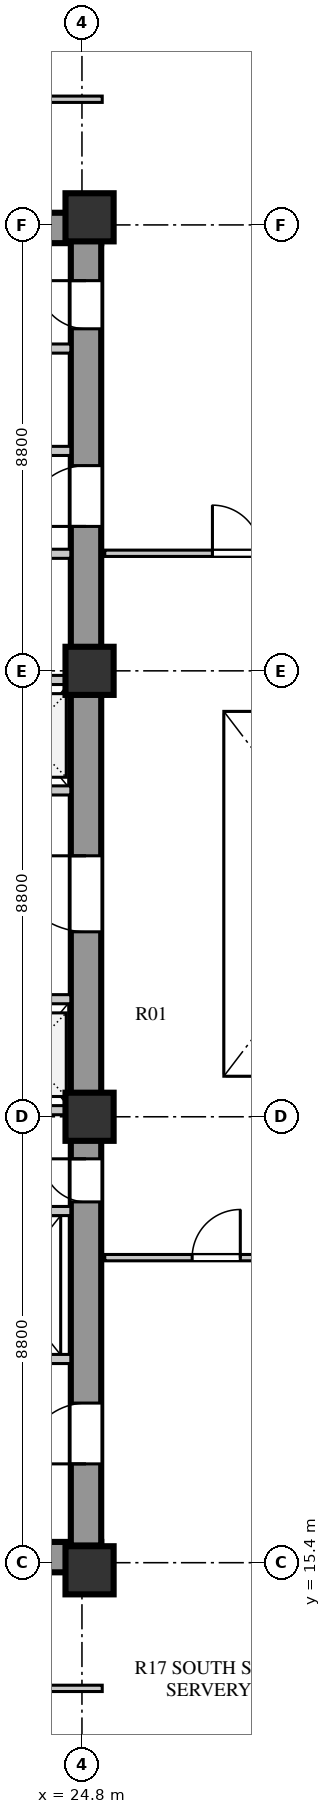
"""IFC4 building model, lengths in metres.
Left out: names, types, materials, properties, quantities, classifications, styles, units other than length and angle.
Written with IfcOpenShell. Run it as: python <this file> out.ifc"""

import sys

from ifc_helpers import new_model, si_unit, direction, frame, frame_2d, origin, origin_2d, place, context, subcontext, project, spatial, rectangle, extrude, element, fill, save


model = new_model("IFC4")
c1 = context("Model", 3, precision=1e-05, world=origin(), true_north=direction((0.0, 1.0)))
c2 = subcontext(c1, "Body", "Model", "MODEL_VIEW")
j1 = project(units=[si_unit("LENGTHUNIT", "METRE"), si_unit("PLANEANGLEUNIT", "RADIAN")], contexts=[c1])
p1 = place(None, origin())
s1 = spatial("IfcSite", under=j1, at=p1, CompositionType="ELEMENT")
p2 = place(p1, origin())
s2 = spatial("IfcBuilding", under=s1, at=p2, CompositionType="ELEMENT")
p3 = place(p2, frame((0.0, 0.0, 90.0)))
s3 = spatial("IfcBuildingStorey", under=s2, at=p3, CompositionType="ELEMENT", Elevation=90.0)
for number, where, z_axis, x_axis in (
    (1, (15.3, 15.51, 0.0), (0.0, 0.0, 1.0), (1.0, 0.0, 0.0)),
    (2, (15.3, 41.74, 0.0), (0.0, 0.0, 1.0), (1.0, 0.0, 0.0)),
):
    element("IfcWall", number, at=place(p3, frame(where, z_axis=z_axis, x_axis=x_axis)), inside=s3, PredefinedType="SHEAR", context=c2, shape_type="SweptSolid", body=[
        extrude(rectangle(XDim=9.88, YDim=0.6, at=frame_2d((4.94, 0.0))), origin(), (0.0, 0.0, 1.0), 3.7),
    ])
p4 = place(p3, frame((24.88, 15.74, 0.0), z_axis=(0.0, 0.0, 1.0), x_axis=(0.0, 1.0, 0.0)))
e3 = element("IfcWall", 3, at=p4, inside=s3, PredefinedType="SHEAR", context=c2, shape_type="SweptSolid", body=[
    extrude(rectangle(XDim=25.76, YDim=0.6, at=frame_2d((12.88, 0.0))), origin(), (0.0, 0.0, 1.0), 3.7),
])
p5 = place(p4, frame((1.61, 0.0, 0.0)))
e4 = element("IfcOpeningElement", 4, at=p5, cuts=e3, PredefinedType="OPENING", context=c2, shape_type="SweptSolid", body=[
    extrude(rectangle(XDim=1.2, YDim=2.1, at=frame_2d((0.6, 1.05))), frame((0.0, 0.31, 0.0), z_axis=(0.0, -1.0, 0.0), x_axis=(1.0, 0.0, 0.0)), (0.0, 0.0, 1.0), 0.62),
])
p6 = place(p4, frame((6.78, 0.0, 0.0)))
e5 = element("IfcOpeningElement", 5, at=p6, cuts=e3, PredefinedType="OPENING", context=c2, shape_type="SweptSolid", body=[
    extrude(rectangle(XDim=0.85, YDim=2.06, at=frame_2d((0.425, 1.03))), frame((0.0, 0.31, 0.0), z_axis=(0.0, -1.0, 0.0), x_axis=(1.0, 0.0, 0.0)), (0.0, 0.0, 1.0), 0.62),
])
p7 = place(p4, frame((12.11, 0.0, 0.0)))
e6 = element("IfcOpeningElement", 6, at=p7, cuts=e3, PredefinedType="OPENING", context=c2, shape_type="SweptSolid", body=[
    extrude(rectangle(XDim=1.5, YDim=2.12, at=frame_2d((0.75, 1.06))), frame((0.0, 0.31, 0.0), z_axis=(0.0, -1.0, 0.0), x_axis=(1.0, 0.0, 0.0)), (0.0, 0.0, 1.0), 0.62),
])
p8 = place(p4, frame((20.11, 0.0, 0.0)))
e7 = element("IfcOpeningElement", 7, at=p8, cuts=e3, PredefinedType="OPENING", context=c2, shape_type="SweptSolid", body=[
    extrude(rectangle(XDim=1.2, YDim=2.12, at=frame_2d((0.6, 1.06))), frame((0.0, 0.31, 0.0), z_axis=(0.0, -1.0, 0.0), x_axis=(1.0, 0.0, 0.0)), (0.0, 0.0, 1.0), 0.62),
])
p9 = place(p4, frame((24.01, 0.0, 0.0)))
e8 = element("IfcOpeningElement", 8, at=p9, cuts=e3, PredefinedType="OPENING", context=c2, shape_type="SweptSolid", body=[
    extrude(rectangle(XDim=0.95, YDim=2.1, at=frame_2d((0.475, 1.05))), frame((0.0, 0.31, 0.0), z_axis=(0.0, -1.0, 0.0), x_axis=(1.0, 0.0, 0.0)), (0.0, 0.0, 1.0), 0.62),
])
for number, where, z_axis, x_axis in (
    (9, (24.95, 15.25, 0.0), (0.0, 0.0, 1.0), (1.0, 0.0, 0.0)),
    (10, (24.95, 24.2, 0.0), (0.0, 0.0, 1.0), (1.0, 0.0, 0.0)),
    (11, (24.95, 33.0, 0.0), (0.0, 0.0, 1.0), (1.0, 0.0, 0.0)),
    (12, (24.95, 41.95, 0.0), (0.0, 0.0, 1.0), (1.0, 0.0, 0.0)),
):
    element("IfcColumn", number, at=place(p3, frame(where, z_axis=z_axis, x_axis=x_axis)), inside=s3, PredefinedType="COLUMN", context=c2, shape_type="SweptSolid", body=[
        extrude(rectangle(XDim=0.95, YDim=0.95, at=origin_2d()), origin(), (0.0, 0.0, 1.0), 3.7),
    ])
p10 = place(p3, frame((19.64, 19.42, 0.0), z_axis=(0.0, 0.0, 1.0), x_axis=(1.0, 0.0, 0.0)))
e13 = element("IfcWall", 13, at=p10, inside=s3, PredefinedType="SOLIDWALL", context=c2, shape_type="SweptSolid", body=[
    extrude(rectangle(XDim=4.94, YDim=0.18, at=frame_2d((2.47, 0.0))), origin(), (0.0, 0.0, 1.0), 3.7),
])
p11 = place(p10, frame((0.72, 0.0, 0.0)))
e14 = element("IfcOpeningElement", 14, at=p11, cuts=e13, PredefinedType="OPENING", context=c2, shape_type="SweptSolid", body=[
    extrude(rectangle(XDim=1.1, YDim=2.1, at=frame_2d((0.55, 1.05))), frame((0.0, 0.1, 0.0), z_axis=(0.0, -1.0, 0.0), x_axis=(1.0, 0.0, 0.0)), (0.0, 0.0, 1.0), 0.2),
])
p12 = place(p10, frame((3.02, 0.0, 0.0)))
e15 = element("IfcOpeningElement", 15, at=p12, cuts=e13, PredefinedType="OPENING", context=c2, shape_type="SweptSolid", body=[
    extrude(rectangle(XDim=1.1, YDim=2.1, at=frame_2d((0.55, 1.05))), frame((0.0, 0.1, 0.0), z_axis=(0.0, -1.0, 0.0), x_axis=(1.0, 0.0, 0.0)), (0.0, 0.0, 1.0), 0.2),
])
p13 = place(p3, frame((19.64, 22.34, 0.0), z_axis=(0.0, 0.0, 1.0), x_axis=(1.0, 0.0, 0.0)))
e16 = element("IfcWall", 16, at=p13, inside=s3, PredefinedType="SOLIDWALL", context=c2, shape_type="SweptSolid", body=[
    extrude(rectangle(XDim=4.94, YDim=0.18, at=frame_2d((2.47, 0.0))), origin(), (0.0, 0.0, 1.0), 3.7),
])
p14 = place(p3, frame((15.9, 26.52, 0.0), z_axis=(0.0, 0.0, 1.0), x_axis=(1.0, 0.0, 0.0)))
e17 = element("IfcWall", 17, at=p14, inside=s3, PredefinedType="SOLIDWALL", context=c2, shape_type="SweptSolid", body=[
    extrude(rectangle(XDim=8.68, YDim=0.18, at=frame_2d((4.34, 0.0))), origin(), (0.0, 0.0, 1.0), 3.7),
])
p15 = place(p14, frame((1.76, 0.0, 0.0)))
e18 = element("IfcOpeningElement", 18, at=p15, cuts=e17, PredefinedType="OPENING", context=c2, shape_type="SweptSolid", body=[
    extrude(rectangle(XDim=1.0, YDim=2.1, at=frame_2d((0.5, 1.05))), frame((0.0, 0.1, 0.0), z_axis=(0.0, -1.0, 0.0), x_axis=(1.0, 0.0, 0.0)), (0.0, 0.0, 1.0), 0.2),
])
p16 = place(p14, frame((3.6, 0.0, 0.0)))
e19 = element("IfcOpeningElement", 19, at=p16, cuts=e17, PredefinedType="OPENING", context=c2, shape_type="SweptSolid", body=[
    extrude(rectangle(XDim=1.0, YDim=2.1, at=frame_2d((0.5, 1.05))), frame((0.0, 0.1, 0.0), z_axis=(0.0, -1.0, 0.0), x_axis=(1.0, 0.0, 0.0)), (0.0, 0.0, 1.0), 0.2),
])
p17 = place(p14, frame((5.44, 0.0, 0.0)))
e20 = element("IfcOpeningElement", 20, at=p17, cuts=e17, PredefinedType="OPENING", context=c2, shape_type="SweptSolid", body=[
    extrude(rectangle(XDim=1.0, YDim=2.1, at=frame_2d((0.5, 1.05))), frame((0.0, 0.1, 0.0), z_axis=(0.0, -1.0, 0.0), x_axis=(1.0, 0.0, 0.0)), (0.0, 0.0, 1.0), 0.2),
])
p18 = place(p14, frame((7.28, 0.0, 0.0)))
e21 = element("IfcOpeningElement", 21, at=p18, cuts=e17, PredefinedType="OPENING", context=c2, shape_type="SweptSolid", body=[
    extrude(rectangle(XDim=1.0, YDim=2.1, at=frame_2d((0.5, 1.05))), frame((0.0, 0.1, 0.0), z_axis=(0.0, -1.0, 0.0), x_axis=(1.0, 0.0, 0.0)), (0.0, 0.0, 1.0), 0.2),
])
p19 = place(p3, frame((15.9, 24.33, 0.0), z_axis=(0.0, 0.0, 1.0), x_axis=(1.0, 0.0, 0.0)))
e22 = element("IfcWall", 22, at=p19, inside=s3, PredefinedType="SOLIDWALL", context=c2, shape_type="SweptSolid", body=[
    extrude(rectangle(XDim=8.68, YDim=0.18, at=frame_2d((4.34, 0.0))), origin(), (0.0, 0.0, 1.0), 3.0),
])
p20 = place(p3, frame((15.9, 30.64, 0.0), z_axis=(0.0, 0.0, 1.0), x_axis=(1.0, 0.0, 0.0)))
e23 = element("IfcWall", 23, at=p20, inside=s3, PredefinedType="SOLIDWALL", context=c2, shape_type="SweptSolid", body=[
    extrude(rectangle(XDim=8.68, YDim=0.18, at=frame_2d((4.34, 0.0))), origin(), (0.0, 0.0, 1.0), 3.7),
])
p21 = place(p20, frame((1.76, 0.0, 0.0)))
e24 = element("IfcOpeningElement", 24, at=p21, cuts=e23, PredefinedType="OPENING", context=c2, shape_type="SweptSolid", body=[
    extrude(rectangle(XDim=1.0, YDim=2.1, at=frame_2d((0.5, 1.05))), frame((0.0, 0.1, 0.0), z_axis=(0.0, -1.0, 0.0), x_axis=(1.0, 0.0, 0.0)), (0.0, 0.0, 1.0), 0.2),
])
p22 = place(p20, frame((3.6, 0.0, 0.0)))
e25 = element("IfcOpeningElement", 25, at=p22, cuts=e23, PredefinedType="OPENING", context=c2, shape_type="SweptSolid", body=[
    extrude(rectangle(XDim=1.0, YDim=2.1, at=frame_2d((0.5, 1.05))), frame((0.0, 0.1, 0.0), z_axis=(0.0, -1.0, 0.0), x_axis=(1.0, 0.0, 0.0)), (0.0, 0.0, 1.0), 0.2),
])
p23 = place(p20, frame((5.44, 0.0, 0.0)))
e26 = element("IfcOpeningElement", 26, at=p23, cuts=e23, PredefinedType="OPENING", context=c2, shape_type="SweptSolid", body=[
    extrude(rectangle(XDim=1.0, YDim=2.1, at=frame_2d((0.5, 1.05))), frame((0.0, 0.1, 0.0), z_axis=(0.0, -1.0, 0.0), x_axis=(1.0, 0.0, 0.0)), (0.0, 0.0, 1.0), 0.2),
])
p24 = place(p20, frame((7.28, 0.0, 0.0)))
e27 = element("IfcOpeningElement", 27, at=p24, cuts=e23, PredefinedType="OPENING", context=c2, shape_type="SweptSolid", body=[
    extrude(rectangle(XDim=1.0, YDim=2.1, at=frame_2d((0.5, 1.05))), frame((0.0, 0.1, 0.0), z_axis=(0.0, -1.0, 0.0), x_axis=(1.0, 0.0, 0.0)), (0.0, 0.0, 1.0), 0.2),
])
p25 = place(p3, frame((15.9, 32.82, 0.0), z_axis=(0.0, 0.0, 1.0), x_axis=(1.0, 0.0, 0.0)))
e28 = element("IfcWall", 28, at=p25, inside=s3, PredefinedType="SOLIDWALL", context=c2, shape_type="SweptSolid", body=[
    extrude(rectangle(XDim=8.68, YDim=0.18, at=frame_2d((4.34, 0.0))), origin(), (0.0, 0.0, 1.0), 3.0),
])
p26 = place(p3, frame((22.02, 35.31, 0.0), z_axis=(0.0, 0.0, 1.0), x_axis=(1.0, 0.0, 0.0)))
e29 = element("IfcWall", 29, at=p26, inside=s3, PredefinedType="SOLIDWALL", context=c2, shape_type="SweptSolid", body=[
    extrude(rectangle(XDim=2.56, YDim=0.18, at=frame_2d((1.28, 0.0))), origin(), (0.0, 0.0, 1.0), 3.7),
])
p27 = place(p26, frame((0.55, 0.0, 0.0)))
e30 = element("IfcOpeningElement", 30, at=p27, cuts=e29, PredefinedType="OPENING", context=c2, shape_type="SweptSolid", body=[
    extrude(rectangle(XDim=1.0, YDim=2.1, at=frame_2d((0.5, 1.05))), frame((0.0, 0.1, 0.0), z_axis=(0.0, -1.0, 0.0), x_axis=(1.0, 0.0, 0.0)), (0.0, 0.0, 1.0), 0.2),
])
p28 = place(p3, frame((19.64, 37.34, 0.0), z_axis=(0.0, 0.0, 1.0), x_axis=(1.0, 0.0, 0.0)))
e31 = element("IfcWall", 31, at=p28, inside=s3, PredefinedType="SOLIDWALL", context=c2, shape_type="SweptSolid", body=[
    extrude(rectangle(XDim=4.94, YDim=0.18, at=frame_2d((2.47, 0.0))), origin(), (0.0, 0.0, 1.0), 3.7),
])
p29 = place(p28, frame((0.45, 0.0, 0.0)))
e32 = element("IfcOpeningElement", 32, at=p29, cuts=e31, PredefinedType="OPENING", context=c2, shape_type="SweptSolid", body=[
    extrude(rectangle(XDim=1.0, YDim=2.1, at=frame_2d((0.5, 1.05))), frame((0.0, 0.1, 0.0), z_axis=(0.0, -1.0, 0.0), x_axis=(1.0, 0.0, 0.0)), (0.0, 0.0, 1.0), 0.2),
])
p30 = place(p28, frame((2.5, 0.0, 0.0)))
e33 = element("IfcOpeningElement", 33, at=p30, cuts=e31, PredefinedType="OPENING", context=c2, shape_type="SweptSolid", body=[
    extrude(rectangle(XDim=1.0, YDim=2.1, at=frame_2d((0.5, 1.05))), frame((0.0, 0.1, 0.0), z_axis=(0.0, -1.0, 0.0), x_axis=(1.0, 0.0, 0.0)), (0.0, 0.0, 1.0), 0.2),
])
p31 = place(p3, frame((19.64, 39.36, 0.0), z_axis=(0.0, 0.0, 1.0), x_axis=(1.0, 0.0, 0.0)))
e34 = element("IfcWall", 34, at=p31, inside=s3, PredefinedType="SOLIDWALL", context=c2, shape_type="SweptSolid", body=[
    extrude(rectangle(XDim=4.94, YDim=0.18, at=frame_2d((2.47, 0.0))), origin(), (0.0, 0.0, 1.0), 3.7),
])
p32 = place(p3, frame((25.25, 21.42, 0.0), z_axis=(0.0, 0.0, 1.0), x_axis=(1.0, 0.0, 0.0)))
e35 = element("IfcWall", 35, at=p32, inside=s3, PredefinedType="PLUMBINGWALL", context=c2, shape_type="SweptSolid", body=[
    extrude(rectangle(XDim=12.87, YDim=0.125, at=frame_2d((6.435, 0.0))), origin(), (0.0, 0.0, 1.0), 3.3),
])
p33 = place(p32, frame((1.725, 0.0, 0.0)))
e36 = element("IfcOpeningElement", 36, at=p33, cuts=e35, PredefinedType="OPENING", context=c2, shape_type="SweptSolid", body=[
    extrude(rectangle(XDim=0.95, YDim=2.08, at=frame_2d((0.475, 1.04))), frame((0.0, 0.073, 0.0), z_axis=(0.0, -1.0, 0.0), x_axis=(1.0, 0.0, 0.0)), (0.0, 0.0, 1.0), 0.145),
])
p34 = place(p32, frame((6.175, 0.0, 0.0)))
e37 = element("IfcOpeningElement", 37, at=p34, cuts=e35, PredefinedType="OPENING", context=c2, shape_type="SweptSolid", body=[
    extrude(rectangle(XDim=0.95, YDim=2.08, at=frame_2d((0.475, 1.04))), frame((0.0, 0.073, 0.0), z_axis=(0.0, -1.0, 0.0), x_axis=(1.0, 0.0, 0.0)), (0.0, 0.0, 1.0), 0.145),
])
p35 = place(p32, frame((10.395, 0.0, 0.0)))
e38 = element("IfcOpeningElement", 38, at=p35, cuts=e35, PredefinedType="OPENING", context=c2, shape_type="SweptSolid", body=[
    extrude(rectangle(XDim=0.95, YDim=2.08, at=frame_2d((0.475, 1.04))), frame((0.0, 0.073, 0.0), z_axis=(0.0, -1.0, 0.0), x_axis=(1.0, 0.0, 0.0)), (0.0, 0.0, 1.0), 0.145),
])
p36 = place(p3, frame((25.25, 35.32, 0.0), z_axis=(0.0, 0.0, 1.0), x_axis=(1.0, 0.0, 0.0)))
e39 = element("IfcWall", 39, at=p36, inside=s3, PredefinedType="PLUMBINGWALL", context=c2, shape_type="SweptSolid", body=[
    extrude(rectangle(XDim=9.47, YDim=0.125, at=frame_2d((4.735, 0.0))), origin(), (0.0, 0.0, 1.0), 3.7),
])
p37 = place(p36, frame((2.125, 0.0, 0.0)))
e40 = element("IfcOpeningElement", 40, at=p37, cuts=e39, PredefinedType="OPENING", context=c2, shape_type="SweptSolid", body=[
    extrude(rectangle(XDim=0.95, YDim=2.08, at=frame_2d((0.475, 1.04))), frame((0.0, 0.073, 0.0), z_axis=(0.0, -1.0, 0.0), x_axis=(1.0, 0.0, 0.0)), (0.0, 0.0, 1.0), 0.145),
])
p38 = place(p36, frame((6.815, 0.0, 0.0)))
e41 = element("IfcOpeningElement", 41, at=p38, cuts=e39, PredefinedType="OPENING", context=c2, shape_type="SweptSolid", body=[
    extrude(rectangle(XDim=0.95, YDim=2.08, at=frame_2d((0.475, 1.04))), frame((0.0, 0.073, 0.0), z_axis=(0.0, -1.0, 0.0), x_axis=(1.0, 0.0, 0.0)), (0.0, 0.0, 1.0), 0.145),
])
p39 = place(p3, frame((10.5, 12.92, 0.0), z_axis=(0.0, 0.0, 1.0), x_axis=(1.0, 0.0, 0.0)))
e42 = element("IfcWall", 42, at=p39, inside=s3, PredefinedType="PLUMBINGWALL", context=c2, shape_type="SweptSolid", body=[
    extrude(rectangle(XDim=14.7, YDim=0.125, at=frame_2d((7.35, 0.0))), origin(), (0.0, 0.0, 1.0), 3.7),
])
p40 = place(p39, frame((6.2, 0.0, 0.0)))
e43 = element("IfcOpeningElement", 43, at=p40, cuts=e42, PredefinedType="OPENING", context=c2, shape_type="SweptSolid", body=[
    extrude(rectangle(XDim=1.0, YDim=2.08, at=frame_2d((0.5, 1.04))), frame((0.0, 0.073, 0.0), z_axis=(0.0, -1.0, 0.0), x_axis=(1.0, 0.0, 0.0)), (0.0, 0.0, 1.0), 0.145),
])
p41 = place(p3, frame((10.5, 44.28, 0.0), z_axis=(0.0, 0.0, 1.0), x_axis=(1.0, 0.0, 0.0)))
e44 = element("IfcWall", 44, at=p41, inside=s3, PredefinedType="PLUMBINGWALL", context=c2, shape_type="SweptSolid", body=[
    extrude(rectangle(XDim=14.7, YDim=0.125, at=frame_2d((7.35, 0.0))), origin(), (0.0, 0.0, 1.0), 3.7),
])
p42 = place(p41, frame((6.2, 0.0, 0.0)))
e45 = element("IfcOpeningElement", 45, at=p42, cuts=e44, PredefinedType="OPENING", context=c2, shape_type="SweptSolid", body=[
    extrude(rectangle(XDim=1.0, YDim=2.08, at=frame_2d((0.5, 1.04))), frame((0.0, 0.073, 0.0), z_axis=(0.0, -1.0, 0.0), x_axis=(1.0, 0.0, 0.0)), (0.0, 0.0, 1.0), 0.145),
])
p43 = place(p5, frame((1.2, 0.0, 0.0), z_axis=(0.0, 0.0, 1.0), x_axis=(-1.0, 0.0, 0.0)))
e46 = element("IfcDoor", 46, at=p43, inside=s3, OperationType="SINGLE_SWING_RIGHT", PredefinedType="DOOR", context=c2, shape_type="SweptSolid", body=[
    extrude(rectangle(XDim=1.2, YDim=2.1, at=frame_2d((0.6, 1.05))), frame((0.0, 0.025, 0.0), z_axis=(0.0, -1.0, 0.0), x_axis=(1.0, 0.0, 0.0)), (0.0, 0.0, 1.0), 0.05),
])
fill(e4, e46)
p44 = place(p6, frame((0.85, 0.0, 0.0), z_axis=(0.0, 0.0, 1.0), x_axis=(-1.0, 0.0, 0.0)))
e47 = element("IfcDoor", 47, at=p44, inside=s3, OperationType="SINGLE_SWING_LEFT", PredefinedType="DOOR", context=c2, shape_type="SweptSolid", body=[
    extrude(rectangle(XDim=0.85, YDim=2.06, at=frame_2d((0.425, 1.03))), frame((0.0, 0.025, 0.0), z_axis=(0.0, -1.0, 0.0), x_axis=(1.0, 0.0, 0.0)), (0.0, 0.0, 1.0), 0.05),
])
fill(e5, e47)
p45 = place(p7, frame((1.5, 0.0, 0.0), z_axis=(0.0, 0.0, 1.0), x_axis=(-1.0, 0.0, 0.0)))
e48 = element("IfcDoor", 48, at=p45, inside=s3, OperationType="SINGLE_SWING_LEFT", PredefinedType="DOOR", context=c2, shape_type="SweptSolid", body=[
    extrude(rectangle(XDim=1.5, YDim=2.12, at=frame_2d((0.75, 1.06))), frame((0.0, 0.025, 0.0), z_axis=(0.0, -1.0, 0.0), x_axis=(1.0, 0.0, 0.0)), (0.0, 0.0, 1.0), 0.05),
])
fill(e6, e48)
p46 = place(p8, frame((1.2, 0.0, 0.0), z_axis=(0.0, 0.0, 1.0), x_axis=(-1.0, 0.0, 0.0)))
e49 = element("IfcDoor", 49, at=p46, inside=s3, OperationType="SINGLE_SWING_RIGHT", PredefinedType="DOOR", context=c2, shape_type="SweptSolid", body=[
    extrude(rectangle(XDim=1.2, YDim=2.12, at=frame_2d((0.6, 1.06))), frame((0.0, 0.025, 0.0), z_axis=(0.0, -1.0, 0.0), x_axis=(1.0, 0.0, 0.0)), (0.0, 0.0, 1.0), 0.05),
])
fill(e7, e49)
p47 = place(p9, frame((0.95, 0.0, 0.0), z_axis=(0.0, 0.0, 1.0), x_axis=(-1.0, 0.0, 0.0)))
e50 = element("IfcDoor", 50, at=p47, inside=s3, OperationType="SINGLE_SWING_LEFT", PredefinedType="DOOR", context=c2, shape_type="SweptSolid", body=[
    extrude(rectangle(XDim=0.95, YDim=2.1, at=frame_2d((0.475, 1.05))), frame((0.0, 0.025, 0.0), z_axis=(0.0, -1.0, 0.0), x_axis=(1.0, 0.0, 0.0)), (0.0, 0.0, 1.0), 0.05),
])
fill(e8, e50)
p48 = place(p33, frame((0.95, 0.0, 0.0), z_axis=(0.0, 0.0, 1.0), x_axis=(-1.0, 0.0, 0.0)))
e51 = element("IfcDoor", 51, at=p48, inside=s3, OperationType="SINGLE_SWING_LEFT", PredefinedType="DOOR", context=c2, shape_type="SweptSolid", body=[
    extrude(rectangle(XDim=0.95, YDim=2.08, at=frame_2d((0.475, 1.04))), frame((0.0, 0.025, 0.0), z_axis=(0.0, -1.0, 0.0), x_axis=(1.0, 0.0, 0.0)), (0.0, 0.0, 1.0), 0.05),
])
fill(e36, e51)
p49 = place(p37, origin())
e52 = element("IfcDoor", 52, at=p49, inside=s3, OperationType="SINGLE_SWING_LEFT", PredefinedType="DOOR", context=c2, shape_type="SweptSolid", body=[
    extrude(rectangle(XDim=0.95, YDim=2.08, at=frame_2d((0.475, 1.04))), frame((0.0, 0.025, 0.0), z_axis=(0.0, -1.0, 0.0), x_axis=(1.0, 0.0, 0.0)), (0.0, 0.0, 1.0), 0.05),
])
fill(e40, e52)
save(model, sys.argv[1])
